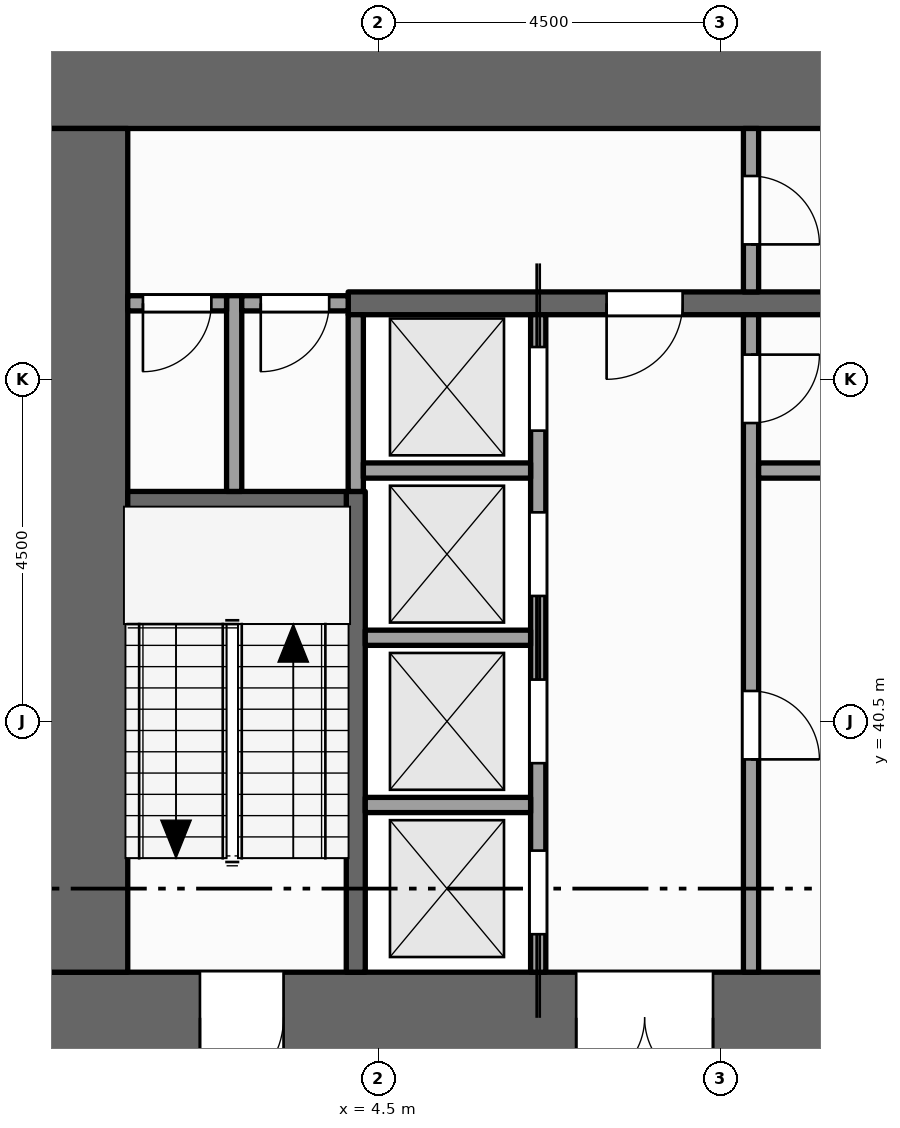
"""IFC4 building model, lengths in metres.
Left out: names, types, materials, properties, quantities, classifications, styles, units other than length and angle.
Written with IfcOpenShell. Run it as: python <this file> out.ifc"""

import sys

from ifc_helpers import new_model, si_unit, direction, frame, frame_2d, origin, place, context, subcontext, project, spatial, rectangle, extrude, element, fill, save


model = new_model("IFC4")
c1 = context("Model", 3, precision=1e-05, world=origin(), true_north=direction((0.0, 1.0)))
c2 = subcontext(c1, "Body", "Model", "MODEL_VIEW")
j1 = project(units=[si_unit("LENGTHUNIT", "METRE"), si_unit("PLANEANGLEUNIT", "RADIAN")], contexts=[c1])
p1 = place(None, origin())
s1 = spatial("IfcSite", under=j1, at=p1, CompositionType="ELEMENT")
p2 = place(p1, origin())
s2 = spatial("IfcBuilding", under=s1, at=p2, CompositionType="ELEMENT")
p3 = place(p2, frame((0.0, 0.0, 127.0)))
s3 = spatial("IfcBuildingStorey", under=s2, at=p3, CompositionType="ELEMENT", Elevation=127.0)
p4 = place(p3, frame((0.0, 36.6, -0.15), z_axis=(0.0, 0.0, 1.0), x_axis=(1.0, 0.0, 0.0)))
e1 = element("IfcWall", 1, at=p4, inside=s3, PredefinedType="SHEAR", context=c2, shape_type="SweptSolid", body=[
    extrude(rectangle(XDim=22.5, YDim=1.2, at=frame_2d((11.25, 0.0))), origin(), (0.0, 0.0, 1.0), 4.0),
])
p5 = place(p4, frame((7.1, 0.0, 0.15)))
e2 = element("IfcOpeningElement", 2, at=p5, cuts=e1, PredefinedType="OPENING", context=c2, shape_type="SweptSolid", body=[
    extrude(rectangle(XDim=1.8, YDim=2.1, at=frame_2d((0.9, 1.05))), frame((0.0, 0.61, 0.0), z_axis=(0.0, -1.0, 0.0), x_axis=(1.0, 0.0, 0.0)), (0.0, 0.0, 1.0), 1.22),
])
p6 = place(p4, frame((13.15, 0.0, 0.15)))
e3 = element("IfcOpeningElement", 3, at=p6, cuts=e1, PredefinedType="OPENING", context=c2, shape_type="SweptSolid", body=[
    extrude(rectangle(XDim=1.1, YDim=2.1, at=frame_2d((0.55, 1.05))), frame((0.0, 0.61, 0.0), z_axis=(0.0, -1.0, 0.0), x_axis=(1.0, 0.0, 0.0)), (0.0, 0.0, 1.0), 1.22),
])
p7 = place(p4, frame((2.15, 0.0, 0.15)))
e4 = element("IfcOpeningElement", 4, at=p7, cuts=e1, PredefinedType="OPENING", context=c2, shape_type="SweptSolid", body=[
    extrude(rectangle(XDim=1.1, YDim=2.1, at=frame_2d((0.55, 1.05))), frame((0.0, 0.61, 0.0), z_axis=(0.0, -1.0, 0.0), x_axis=(1.0, 0.0, 0.0)), (0.0, 0.0, 1.0), 1.22),
])
p8 = place(p4, frame((19.35, 0.0, 0.15)))
e5 = element("IfcOpeningElement", 5, at=p8, cuts=e1, PredefinedType="OPENING", context=c2, shape_type="SweptSolid", body=[
    extrude(rectangle(XDim=1.1, YDim=2.1, at=frame_2d((0.55, 1.05))), frame((0.0, 0.61, 0.0), z_axis=(0.0, -1.0, 0.0), x_axis=(1.0, 0.0, 0.0)), (0.0, 0.0, 1.0), 1.22),
])
p9 = place(p3, frame((0.0, 48.9, -0.15), z_axis=(0.0, 0.0, 1.0), x_axis=(1.0, 0.0, 0.0)))
e6 = element("IfcWall", 6, at=p9, inside=s3, PredefinedType="SHEAR", context=c2, shape_type="SweptSolid", body=[
    extrude(rectangle(XDim=22.5, YDim=1.2, at=frame_2d((11.25, 0.0))), origin(), (0.0, 0.0, 1.0), 4.0),
])
p10 = place(p3, frame((0.6, 37.2, -0.15), z_axis=(0.0, 0.0, 1.0), x_axis=(0.0, 1.0, 0.0)))
e7 = element("IfcWall", 7, at=p10, inside=s3, PredefinedType="SHEAR", context=c2, shape_type="SweptSolid", body=[
    extrude(rectangle(XDim=11.1, YDim=1.2, at=frame_2d((5.55, 0.0))), origin(), (0.0, 0.0, 1.0), 4.0),
])
p11 = place(p3, frame((2.6, 43.525, 0.0), z_axis=(0.0, 0.0, 1.0), x_axis=(0.0, 1.0, 0.0)))
e8 = element("IfcWall", 8, at=p11, inside=s3, PredefinedType="PARTITIONING", context=c2, shape_type="SweptSolid", body=[
    extrude(rectangle(XDim=2.575, YDim=0.2, at=frame_2d((1.288, 0.0))), origin(), (0.0, 0.0, 1.0), 3.75),
])
p12 = place(p3, frame((4.2, 37.2, 0.0), z_axis=(0.0, 0.0, 1.0), x_axis=(0.0, 1.0, 0.0)))
e9 = element("IfcWall", 9, at=p12, inside=s3, PredefinedType="SHEAR", context=c2, shape_type="SweptSolid", body=[
    extrude(rectangle(XDim=6.325, YDim=0.25, at=frame_2d((3.163, 0.0))), origin(), (0.0, 0.0, 1.0), 3.75),
])
p13 = place(p3, frame((4.2, 43.525, 0.0), z_axis=(0.0, 0.0, 1.0), x_axis=(0.0, 1.0, 0.0)))
e10 = element("IfcWall", 10, at=p13, inside=s3, PredefinedType="SOLIDWALL", context=c2, shape_type="SweptSolid", body=[
    extrude(rectangle(XDim=2.325, YDim=0.2, at=frame_2d((1.163, 0.0))), origin(), (0.0, 0.0, 1.0), 3.75),
])
p14 = place(p3, frame((6.6, 37.2, 0.0), z_axis=(0.0, 0.0, 1.0), x_axis=(0.0, 1.0, 0.0)))
e11 = element("IfcWall", 11, at=p14, inside=s3, PredefinedType="SOLIDWALL", context=c2, shape_type="SweptSolid", body=[
    extrude(rectangle(XDim=8.65, YDim=0.2, at=frame_2d((4.325, 0.0))), origin(), (0.0, 0.0, 1.0), 3.75),
])
p15 = place(p14, frame((0.5, 0.0, 0.012)))
e12 = element("IfcOpeningElement", 12, at=p15, cuts=e11, PredefinedType="OPENING", context=c2, shape_type="SweptSolid", body=[
    extrude(rectangle(XDim=1.1, YDim=2.1, at=frame_2d((0.55, 1.05))), frame((0.0, 0.11, 0.0), z_axis=(0.0, -1.0, 0.0), x_axis=(1.0, 0.0, 0.0)), (0.0, 0.0, 1.0), 0.22),
])
p16 = place(p14, frame((2.75, 0.0, 0.012)))
e13 = element("IfcOpeningElement", 13, at=p16, cuts=e11, PredefinedType="OPENING", context=c2, shape_type="SweptSolid", body=[
    extrude(rectangle(XDim=1.1, YDim=2.1, at=frame_2d((0.55, 1.05))), frame((0.0, 0.11, 0.0), z_axis=(0.0, -1.0, 0.0), x_axis=(1.0, 0.0, 0.0)), (0.0, 0.0, 1.0), 0.22),
])
p17 = place(p14, frame((4.95, 0.0, 0.012)))
e14 = element("IfcOpeningElement", 14, at=p17, cuts=e11, PredefinedType="OPENING", context=c2, shape_type="SweptSolid", body=[
    extrude(rectangle(XDim=1.1, YDim=2.1, at=frame_2d((0.55, 1.05))), frame((0.0, 0.11, 0.0), z_axis=(0.0, -1.0, 0.0), x_axis=(1.0, 0.0, 0.0)), (0.0, 0.0, 1.0), 0.22),
])
p18 = place(p14, frame((7.125, 0.0, 0.012)))
e15 = element("IfcOpeningElement", 15, at=p18, cuts=e11, PredefinedType="OPENING", context=c2, shape_type="SweptSolid", body=[
    extrude(rectangle(XDim=1.1, YDim=2.1, at=frame_2d((0.55, 1.05))), frame((0.0, 0.11, 0.0), z_axis=(0.0, -1.0, 0.0), x_axis=(1.0, 0.0, 0.0)), (0.0, 0.0, 1.0), 0.22),
])
p19 = place(p3, frame((9.4, 37.2, 0.0), z_axis=(0.0, 0.0, 1.0), x_axis=(0.0, 1.0, 0.0)))
e16 = element("IfcWall", 16, at=p19, inside=s3, PredefinedType="PARTITIONING", context=c2, shape_type="SweptSolid", body=[
    extrude(rectangle(XDim=8.65, YDim=0.2, at=frame_2d((4.325, 0.0))), origin(), (0.0, 0.0, 1.0), 3.75),
])
p20 = place(p19, frame((2.8, 0.0, 0.0)))
e17 = element("IfcOpeningElement", 17, at=p20, cuts=e16, PredefinedType="OPENING", context=c2, shape_type="SweptSolid", body=[
    extrude(rectangle(XDim=0.9, YDim=2.1, at=frame_2d((0.45, 1.05))), frame((0.0, 0.11, 0.0), z_axis=(0.0, -1.0, 0.0), x_axis=(1.0, 0.0, 0.0)), (0.0, 0.0, 1.0), 0.22),
])
p21 = place(p19, frame((7.225, 0.0, 0.0)))
e18 = element("IfcOpeningElement", 18, at=p21, cuts=e16, PredefinedType="OPENING", context=c2, shape_type="SweptSolid", body=[
    extrude(rectangle(XDim=0.9, YDim=2.1, at=frame_2d((0.45, 1.05))), frame((0.0, 0.11, 0.0), z_axis=(0.0, -1.0, 0.0), x_axis=(1.0, 0.0, 0.0)), (0.0, 0.0, 1.0), 0.22),
])
p22 = place(p3, frame((9.4, 46.15, 0.0), z_axis=(0.0, 0.0, 1.0), x_axis=(0.0, 1.0, 0.0)))
e19 = element("IfcWall", 19, at=p22, inside=s3, PredefinedType="PARTITIONING", context=c2, shape_type="SweptSolid", body=[
    extrude(rectangle(XDim=2.15, YDim=0.2, at=frame_2d((1.075, 0.0))), origin(), (0.0, 0.0, 1.0), 3.75),
])
p23 = place(p22, frame((0.625, 0.0, 0.0)))
e20 = element("IfcOpeningElement", 20, at=p23, cuts=e19, PredefinedType="OPENING", context=c2, shape_type="SweptSolid", body=[
    extrude(rectangle(XDim=0.9, YDim=2.1, at=frame_2d((0.45, 1.05))), frame((0.0, 0.11, 0.0), z_axis=(0.0, -1.0, 0.0), x_axis=(1.0, 0.0, 0.0)), (0.0, 0.0, 1.0), 0.22),
])
for number, where, z_axis, x_axis in (
    (21, (4.325, 39.4, 0.0), (0.0, 0.0, 1.0), (1.0, 0.0, 0.0)),
    (22, (4.325, 41.6, 0.0), (0.0, 0.0, 1.0), (1.0, 0.0, 0.0)),
):
    element("IfcWall", number, at=place(p3, frame(where, z_axis=z_axis, x_axis=x_axis)), inside=s3, PredefinedType="SOLIDWALL", context=c2, shape_type="SweptSolid", body=[
        extrude(rectangle(XDim=2.175, YDim=0.2, at=frame_2d((1.087, 0.0))), origin(), (0.0, 0.0, 1.0), 3.75),
    ])
p24 = place(p3, frame((1.2, 43.4, 0.0), z_axis=(0.0, 0.0, 1.0), x_axis=(1.0, 0.0, 0.0)))
e23 = element("IfcWall", 23, at=p24, inside=s3, PredefinedType="SHEAR", context=c2, shape_type="SweptSolid", body=[
    extrude(rectangle(XDim=2.875, YDim=0.25, at=frame_2d((1.438, 0.0))), origin(), (0.0, 0.0, 1.0), 3.75),
])
p25 = place(p3, frame((4.3, 43.8, 0.0), z_axis=(0.0, 0.0, 1.0), x_axis=(1.0, 0.0, 0.0)))
e24 = element("IfcWall", 24, at=p25, inside=s3, PredefinedType="SOLIDWALL", context=c2, shape_type="SweptSolid", body=[
    extrude(rectangle(XDim=2.2, YDim=0.2, at=frame_2d((1.1, 0.0))), origin(), (0.0, 0.0, 1.0), 3.75),
])
p26 = place(p3, frame((9.5, 43.8, 0.0), z_axis=(0.0, 0.0, 1.0), x_axis=(1.0, 0.0, 0.0)))
e25 = element("IfcWall", 25, at=p26, inside=s3, PredefinedType="PARTITIONING", context=c2, shape_type="SweptSolid", body=[
    extrude(rectangle(XDim=2.2, YDim=0.2, at=frame_2d((1.1, 0.0))), origin(), (0.0, 0.0, 1.0), 3.75),
])
p27 = place(p3, frame((1.2, 46.0, 0.0), z_axis=(0.0, 0.0, 1.0), x_axis=(1.0, 0.0, 0.0)))
e26 = element("IfcWall", 26, at=p27, inside=s3, PredefinedType="PARTITIONING", context=c2, shape_type="SweptSolid", body=[
    extrude(rectangle(XDim=1.3, YDim=0.2, at=frame_2d((0.65, 0.0))), origin(), (0.0, 0.0, 1.0), 3.75),
])
p28 = place(p27, frame((0.2, 0.0, 0.0)))
e27 = element("IfcOpeningElement", 27, at=p28, cuts=e26, PredefinedType="OPENING", context=c2, shape_type="SweptSolid", body=[
    extrude(rectangle(XDim=0.9, YDim=2.1, at=frame_2d((0.45, 1.05))), frame((0.0, 0.11, 0.0), z_axis=(0.0, -1.0, 0.0), x_axis=(1.0, 0.0, 0.0)), (0.0, 0.0, 1.0), 0.22),
])
p29 = place(p3, frame((2.7, 46.0, 0.0), z_axis=(0.0, 0.0, 1.0), x_axis=(1.0, 0.0, 0.0)))
e28 = element("IfcWall", 28, at=p29, inside=s3, PredefinedType="PARTITIONING", context=c2, shape_type="SweptSolid", body=[
    extrude(rectangle(XDim=1.4, YDim=0.2, at=frame_2d((0.7, 0.0))), origin(), (0.0, 0.0, 1.0), 3.75),
])
p30 = place(p29, frame((0.25, 0.0, 0.0)))
e29 = element("IfcOpeningElement", 29, at=p30, cuts=e28, PredefinedType="OPENING", context=c2, shape_type="SweptSolid", body=[
    extrude(rectangle(XDim=0.9, YDim=2.1, at=frame_2d((0.45, 1.05))), frame((0.0, 0.11, 0.0), z_axis=(0.0, -1.0, 0.0), x_axis=(1.0, 0.0, 0.0)), (0.0, 0.0, 1.0), 0.22),
])
p31 = place(p3, frame((4.1, 46.0, 0.0), z_axis=(0.0, 0.0, 1.0), x_axis=(1.0, 0.0, 0.0)))
e30 = element("IfcWall", 30, at=p31, inside=s3, PredefinedType="SHEAR", context=c2, shape_type="SweptSolid", body=[
    extrude(rectangle(XDim=14.5, YDim=0.3, at=frame_2d((7.25, 0.0))), origin(), (0.0, 0.0, 1.0), 3.75),
])
p32 = place(p31, frame((3.4, 0.0, 0.0)))
e31 = element("IfcOpeningElement", 31, at=p32, cuts=e30, PredefinedType="OPENING", context=c2, shape_type="SweptSolid", body=[
    extrude(rectangle(XDim=1.0, YDim=2.1, at=frame_2d((0.5, 1.05))), frame((0.0, 0.16, 0.0), z_axis=(0.0, -1.0, 0.0), x_axis=(1.0, 0.0, 0.0)), (0.0, 0.0, 1.0), 0.32),
])
p33 = place(p31, frame((9.1, 0.0, 0.0)))
e32 = element("IfcOpeningElement", 32, at=p33, cuts=e30, PredefinedType="OPENING", context=c2, shape_type="SweptSolid", body=[
    extrude(rectangle(XDim=1.0, YDim=2.1, at=frame_2d((0.5, 1.05))), frame((0.0, 0.16, 0.0), z_axis=(0.0, -1.0, 0.0), x_axis=(1.0, 0.0, 0.0)), (0.0, 0.0, 1.0), 0.32),
])
p34 = place(p15, origin())
e33 = element("IfcDoor", 33, at=p34, inside=s3, OperationType="SLIDING_TO_LEFT", PredefinedType="DOOR", context=c2, shape_type="SweptSolid", body=[
    extrude(rectangle(XDim=1.1, YDim=2.1, at=frame_2d((0.55, 1.05))), frame((0.0, 0.025, 0.0), z_axis=(0.0, -1.0, 0.0), x_axis=(1.0, 0.0, 0.0)), (0.0, 0.0, 1.0), 0.05),
])
fill(e12, e33)
p35 = place(p16, origin())
e34 = element("IfcDoor", 34, at=p35, inside=s3, OperationType="SLIDING_TO_RIGHT", PredefinedType="DOOR", context=c2, shape_type="SweptSolid", body=[
    extrude(rectangle(XDim=1.1, YDim=2.1, at=frame_2d((0.55, 1.05))), frame((0.0, 0.025, 0.0), z_axis=(0.0, -1.0, 0.0), x_axis=(1.0, 0.0, 0.0)), (0.0, 0.0, 1.0), 0.05),
])
fill(e13, e34)
p36 = place(p17, origin())
e35 = element("IfcDoor", 35, at=p36, inside=s3, OperationType="SLIDING_TO_LEFT", PredefinedType="DOOR", context=c2, shape_type="SweptSolid", body=[
    extrude(rectangle(XDim=1.1, YDim=2.1, at=frame_2d((0.55, 1.05))), frame((0.0, 0.025, 0.0), z_axis=(0.0, -1.0, 0.0), x_axis=(1.0, 0.0, 0.0)), (0.0, 0.0, 1.0), 0.05),
])
fill(e14, e35)
p37 = place(p18, origin())
e36 = element("IfcDoor", 36, at=p37, inside=s3, OperationType="SLIDING_TO_RIGHT", PredefinedType="DOOR", context=c2, shape_type="SweptSolid", body=[
    extrude(rectangle(XDim=1.1, YDim=2.1, at=frame_2d((0.55, 1.05))), frame((0.0, 0.025, 0.0), z_axis=(0.0, -1.0, 0.0), x_axis=(1.0, 0.0, 0.0)), (0.0, 0.0, 1.0), 0.05),
])
fill(e15, e36)
p38 = place(p5, origin())
e37 = element("IfcDoor", 37, at=p38, inside=s3, OperationType="DOUBLE_DOOR_SINGLE_SWING", PredefinedType="DOOR", context=c2, shape_type="SweptSolid", body=[
    extrude(rectangle(XDim=1.8, YDim=2.1, at=frame_2d((0.9, 1.05))), frame((0.0, 0.025, 0.0), z_axis=(0.0, -1.0, 0.0), x_axis=(1.0, 0.0, 0.0)), (0.0, 0.0, 1.0), 0.05),
])
fill(e2, e37)
p39 = place(p32, origin())
e38 = element("IfcDoor", 38, at=p39, inside=s3, OperationType="SINGLE_SWING_LEFT", PredefinedType="DOOR", context=c2, shape_type="SweptSolid", body=[
    extrude(rectangle(XDim=1.0, YDim=2.1, at=frame_2d((0.5, 1.05))), frame((0.0, 0.025, 0.0), z_axis=(0.0, -1.0, 0.0), x_axis=(1.0, 0.0, 0.0)), (0.0, 0.0, 1.0), 0.05),
])
fill(e31, e38)
p40 = place(p23, origin())
e39 = element("IfcDoor", 39, at=p40, inside=s3, OperationType="SINGLE_SWING_LEFT", PredefinedType="DOOR", context=c2, shape_type="SweptSolid", body=[
    extrude(rectangle(XDim=0.9, YDim=2.1, at=frame_2d((0.45, 1.05))), frame((0.0, 0.025, 0.0), z_axis=(0.0, -1.0, 0.0), x_axis=(1.0, 0.0, 0.0)), (0.0, 0.0, 1.0), 0.05),
])
fill(e20, e39)
p41 = place(p7, origin())
e40 = element("IfcDoor", 40, at=p41, inside=s3, OperationType="SINGLE_SWING_LEFT", PredefinedType="DOOR", context=c2, shape_type="SweptSolid", body=[
    extrude(rectangle(XDim=1.1, YDim=2.1, at=frame_2d((0.55, 1.05))), frame((0.0, 0.025, 0.0), z_axis=(0.0, -1.0, 0.0), x_axis=(1.0, 0.0, 0.0)), (0.0, 0.0, 1.0), 0.05),
])
fill(e4, e40)
p42 = place(p28, origin())
e41 = element("IfcDoor", 41, at=p42, inside=s3, OperationType="SINGLE_SWING_LEFT", PredefinedType="DOOR", context=c2, shape_type="SweptSolid", body=[
    extrude(rectangle(XDim=0.9, YDim=2.1, at=frame_2d((0.45, 1.05))), frame((0.0, 0.025, 0.0), z_axis=(0.0, -1.0, 0.0), x_axis=(1.0, 0.0, 0.0)), (0.0, 0.0, 1.0), 0.05),
])
fill(e27, e41)
p43 = place(p30, origin())
e42 = element("IfcDoor", 42, at=p43, inside=s3, OperationType="SINGLE_SWING_LEFT", PredefinedType="DOOR", context=c2, shape_type="SweptSolid", body=[
    extrude(rectangle(XDim=0.9, YDim=2.1, at=frame_2d((0.45, 1.05))), frame((0.0, 0.025, 0.0), z_axis=(0.0, -1.0, 0.0), x_axis=(1.0, 0.0, 0.0)), (0.0, 0.0, 1.0), 0.05),
])
fill(e29, e42)
p44 = place(p20, origin())
e43 = element("IfcDoor", 43, at=p44, inside=s3, OperationType="SINGLE_SWING_LEFT", PredefinedType="DOOR", context=c2, shape_type="SweptSolid", body=[
    extrude(rectangle(XDim=0.9, YDim=2.1, at=frame_2d((0.45, 1.05))), frame((0.0, 0.025, 0.0), z_axis=(0.0, -1.0, 0.0), x_axis=(1.0, 0.0, 0.0)), (0.0, 0.0, 1.0), 0.05),
])
fill(e17, e43)
p45 = place(p21, origin())
e44 = element("IfcDoor", 44, at=p45, inside=s3, OperationType="SINGLE_SWING_RIGHT", PredefinedType="DOOR", context=c2, shape_type="SweptSolid", body=[
    extrude(rectangle(XDim=0.9, YDim=2.1, at=frame_2d((0.45, 1.05))), frame((0.0, 0.025, 0.0), z_axis=(0.0, -1.0, 0.0), x_axis=(1.0, 0.0, 0.0)), (0.0, 0.0, 1.0), 0.05),
])
fill(e18, e44)
save(model, sys.argv[1])
